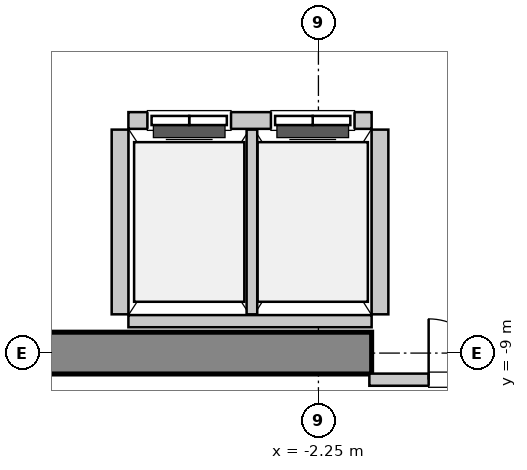
"""IFC4 building model, lengths in metres.
Left out: names, types, materials, properties, quantities, classifications, styles, units other than length and angle.
Written with IfcOpenShell. Run it as: python <this file> out.ifc"""

import sys

from ifc_helpers import new_model, si_unit, direction, frame, frame_2d, origin, place, context, subcontext, project, spatial, rectangle, extrude, source, transform, mapped, element, fill, save


model = new_model("IFC4")
c1 = context("Model", 3, precision=1e-05, world=origin(), true_north=direction((0.0, 1.0)))
c2 = subcontext(c1, "Body", "Model", "MODEL_VIEW")
j1 = project(units=[si_unit("LENGTHUNIT", "METRE"), si_unit("PLANEANGLEUNIT", "RADIAN")], contexts=[c1])
p1 = place(None, origin())
s1 = spatial("IfcSite", under=j1, at=p1, CompositionType="ELEMENT")
p2 = place(p1, origin())
s2 = spatial("IfcBuilding", under=s1, at=p2, CompositionType="ELEMENT")
p3 = place(p2, frame((0.0, 0.0, 148.8)))
s3 = spatial("IfcBuildingStorey", under=s2, at=p3, CompositionType="ELEMENT", Elevation=148.8)
m1 = source(origin(), c2, "Body", "SweptSolid", [
    extrude(rectangle(XDim=9.975, YDim=0.55, at=frame_2d((4.987, 0.0))), origin(), (0.0, 0.0, 1.0), 3.8),
])
p4 = place(p3, frame((-11.525, -9.0, 0.0), z_axis=(0.0, 0.0, 1.0), x_axis=(1.0, 0.0, 0.0)))
e1 = element("IfcWall", 1, at=p4, inside=s3, PredefinedType="SHEAR", context=c2, shape_type="MappedRepresentation", body=[
    mapped(m1, transform((0.0, 0.0, 0.0), x_axis=(1.0, 0.0, 0.0), y_axis=(0.0, 1.0, 0.0), z_axis=(0.0, 0.0, 1.0), scale=1.0)),
])
m2 = source(origin(), c2, "Body", "SweptSolid", [
    extrude(rectangle(XDim=3.2, YDim=0.22, at=frame_2d((1.6, 0.0))), origin(), (0.0, 0.0, 1.0), 3.535),
])
p5 = place(p3, frame((-1.55, -5.94, 0.0), z_axis=(0.0, 0.0, 1.0), x_axis=(-1.0, 0.0, 0.0)))
e2 = element("IfcWall", 2, at=p5, inside=s3, PredefinedType="SOLIDWALL", context=c2, shape_type="MappedRepresentation", body=[
    mapped(m2, transform((0.0, 0.0, 0.0), x_axis=(1.0, 0.0, 0.0), y_axis=(0.0, 1.0, 0.0), z_axis=(0.0, 0.0, 1.0), scale=1.0)),
])
p6 = place(p5, frame((1.85, 0.0, 0.0)))
e3 = element("IfcOpeningElement", 3, at=p6, cuts=e2, PredefinedType="OPENING", context=c2, shape_type="SweptSolid", body=[
    extrude(rectangle(XDim=1.1, YDim=2.2, at=frame_2d((0.55, 1.1))), frame((0.0, 0.12, 0.0), z_axis=(0.0, -1.0, 0.0), x_axis=(1.0, 0.0, 0.0)), (0.0, 0.0, 1.0), 0.24),
])
p7 = place(p5, frame((0.225, 0.0, 0.0)))
e4 = element("IfcOpeningElement", 4, at=p7, cuts=e2, PredefinedType="OPENING", context=c2, shape_type="SweptSolid", body=[
    extrude(rectangle(XDim=1.1, YDim=2.2, at=frame_2d((0.55, 1.1))), frame((0.0, 0.12, 0.0), z_axis=(0.0, -1.0, 0.0), x_axis=(1.0, 0.0, 0.0)), (0.0, 0.0, 1.0), 0.24),
])
m3 = source(origin(), c2, "Body", "SweptSolid", [
    extrude(rectangle(XDim=3.2, YDim=0.16, at=frame_2d((1.6, 0.0))), origin(), (0.0, 0.0, 1.0), 2.425),
])
p8 = place(p3, frame((-4.75, -8.58, 0.0), z_axis=(0.0, 0.0, 1.0), x_axis=(1.0, 0.0, 0.0)))
e5 = element("IfcWall", 5, at=p8, inside=s3, PredefinedType="PARTITIONING", context=c2, shape_type="MappedRepresentation", body=[
    mapped(m3, transform((0.0, 0.0, 0.0), x_axis=(1.0, 0.0, 0.0), y_axis=(0.0, 1.0, 0.0), z_axis=(0.0, 0.0, 1.0), scale=1.0)),
])
m4 = source(origin(), c2, "Body", "SweptSolid", [
    extrude(rectangle(XDim=2.43, YDim=0.22, at=frame_2d((1.215, 0.0))), origin(), (0.0, 0.0, 1.0), 3.535),
])
p9 = place(p3, frame((-4.86, -6.06, 0.0), z_axis=(0.0, 0.0, 1.0), x_axis=(0.0, -1.0, 0.0)))
e6 = element("IfcWall", 6, at=p9, inside=s3, PredefinedType="SOLIDWALL", context=c2, shape_type="MappedRepresentation", body=[
    mapped(m4, transform((0.0, 0.0, 0.0), x_axis=(1.0, 0.0, 0.0), y_axis=(0.0, 1.0, 0.0), z_axis=(0.0, 0.0, 1.0), scale=1.0)),
])
m5 = source(origin(), c2, "Body", "SweptSolid", [
    extrude(rectangle(XDim=2.43, YDim=0.14, at=frame_2d((1.215, 0.0))), origin(), (0.0, 0.0, 1.0), 3.535),
])
p10 = place(p3, frame((-3.125, -8.49, 0.0), z_axis=(0.0, 0.0, 1.0), x_axis=(0.0, 1.0, 0.0)))
e7 = element("IfcWall", 7, at=p10, inside=s3, PredefinedType="PARTITIONING", context=c2, shape_type="MappedRepresentation", body=[
    mapped(m5, transform((0.0, 0.0, 0.0), x_axis=(1.0, 0.0, 0.0), y_axis=(0.0, 1.0, 0.0), z_axis=(0.0, 0.0, 1.0), scale=1.0)),
])
p11 = place(p3, frame((-1.44, -8.49, 0.0), z_axis=(0.0, 0.0, 1.0), x_axis=(0.0, 1.0, 0.0)))
e8 = element("IfcWall", 8, at=p11, inside=s3, PredefinedType="SOLIDWALL", context=c2, shape_type="MappedRepresentation", body=[
    mapped(m4, transform((0.0, 0.0, 0.0), x_axis=(1.0, 0.0, 0.0), y_axis=(0.0, 1.0, 0.0), z_axis=(0.0, 0.0, 1.0), scale=1.0)),
])
m6 = source(origin(), c2, "Body", "SweptSolid", [
    extrude(rectangle(XDim=3.16, YDim=0.16, at=frame_2d((1.58, 0.0))), origin(), (0.0, 0.0, 1.0), 2.425),
])
p12 = place(p3, frame((-1.58, -9.35, 0.0), z_axis=(0.0, 0.0, 1.0), x_axis=(1.0, 0.0, 0.0)))
e9 = element("IfcWall", 9, at=p12, inside=s3, PredefinedType="PARTITIONING", context=c2, shape_type="MappedRepresentation", body=[
    mapped(m6, transform((0.0, 0.0, 0.0), x_axis=(1.0, 0.0, 0.0), y_axis=(0.0, 1.0, 0.0), z_axis=(0.0, 0.0, 1.0), scale=1.0)),
])
p13 = place(p12, frame((0.78, 0.0, 0.0)))
e10 = element("IfcOpeningElement", 10, at=p13, cuts=e9, PredefinedType="OPENING", context=c2, shape_type="SweptSolid", body=[
    extrude(rectangle(XDim=1.6, YDim=2.3, at=frame_2d((0.8, 1.15))), frame((0.0, 0.09, 0.0), z_axis=(0.0, -1.0, 0.0), x_axis=(1.0, 0.0, 0.0)), (0.0, 0.0, 1.0), 0.18),
])
m7 = source(origin(), c2, "Body", "SweptSolid", [
    extrude(rectangle(XDim=1.1, YDim=2.2, at=frame_2d((0.55, 1.1))), frame((0.0, 0.025, 0.0), z_axis=(0.0, -1.0, 0.0), x_axis=(1.0, 0.0, 0.0)), (0.0, 0.0, 1.0), 0.05),
])
p14 = place(p6, origin())
e11 = element("IfcDoor", 11, at=p14, inside=s3, OperationType="DOUBLE_DOOR_SLIDING", PredefinedType="DOOR", context=c2, shape_type="MappedRepresentation", body=[
    mapped(m7, transform((0.0, 0.0, 0.0), x_axis=(1.0, 0.0, 0.0), y_axis=(0.0, 1.0, 0.0), z_axis=(0.0, 0.0, 1.0), scale=1.0)),
])
fill(e3, e11)
p15 = place(p7, origin())
e12 = element("IfcDoor", 12, at=p15, inside=s3, OperationType="DOUBLE_DOOR_SLIDING", PredefinedType="DOOR", context=c2, shape_type="MappedRepresentation", body=[
    mapped(m7, transform((0.0, 0.0, 0.0), x_axis=(1.0, 0.0, 0.0), y_axis=(0.0, 1.0, 0.0), z_axis=(0.0, 0.0, 1.0), scale=1.0)),
])
fill(e4, e12)
m8 = source(origin(), c2, "Body", "SweptSolid", [
    extrude(rectangle(XDim=1.6, YDim=2.3, at=frame_2d((0.8, 1.15))), frame((0.0, 0.025, 0.0), z_axis=(0.0, -1.0, 0.0), x_axis=(1.0, 0.0, 0.0)), (0.0, 0.0, 1.0), 0.05),
])
p16 = place(p13, origin())
e13 = element("IfcDoor", 13, at=p16, inside=s3, OperationType="DOUBLE_DOOR_SINGLE_SWING", PredefinedType="DOOR", context=c2, shape_type="MappedRepresentation", body=[
    mapped(m8, transform((0.0, 0.0, 0.0), x_axis=(1.0, 0.0, 0.0), y_axis=(0.0, 1.0, 0.0), z_axis=(0.0, 0.0, 1.0), scale=1.0)),
])
fill(e10, e13)
save(model, sys.argv[1])
